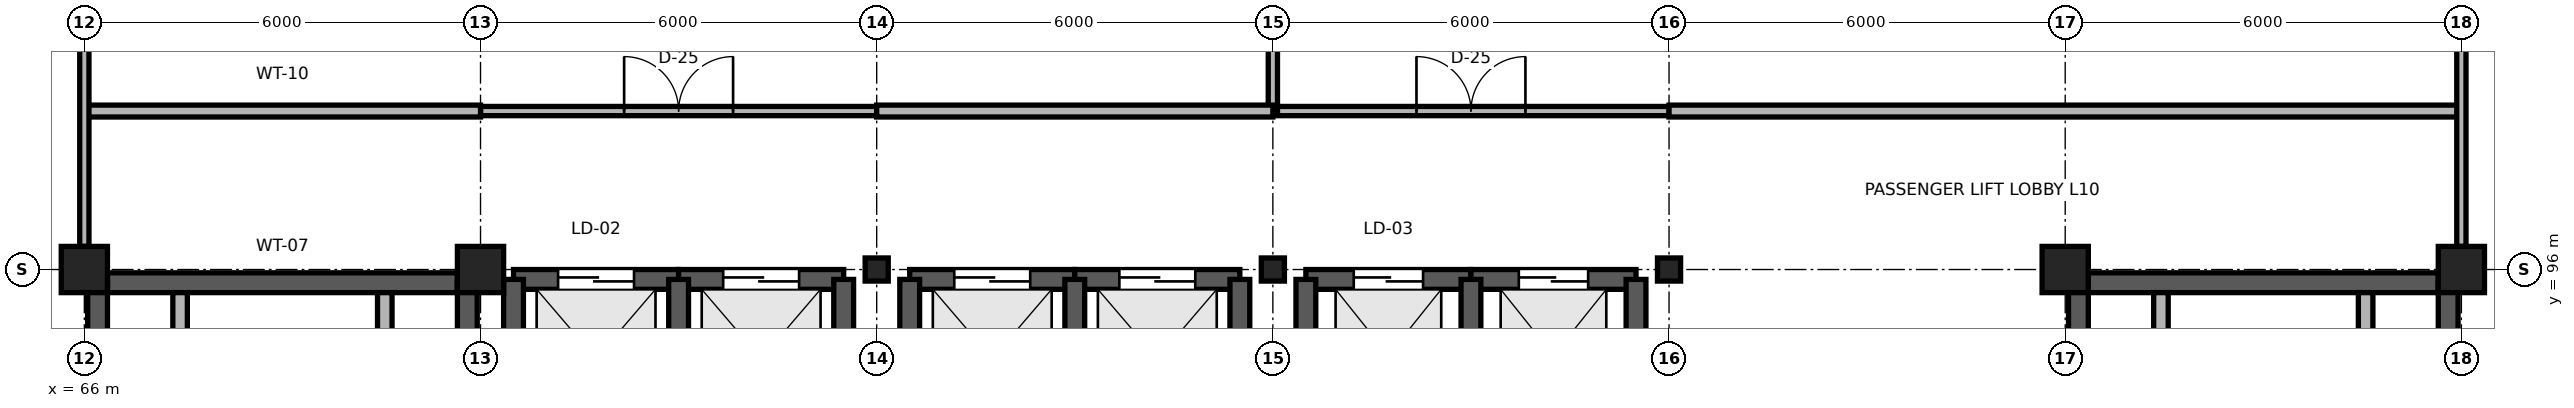
"""IFC4 building model, lengths in metres.
Left out: names, types, materials, properties, quantities, classifications, styles, units other than length and angle.
Written with IfcOpenShell. Run it as: python <this file> out.ifc"""

import sys

from ifc_helpers import new_model, si_unit, direction, frame, frame_2d, origin, origin_2d, place, context, subcontext, project, spatial, rectangle, i_section, extrude, element, fill, save


model = new_model("IFC4")
c1 = context("Model", 3, precision=1e-05, world=origin(), true_north=direction((0.0, 1.0)))
c2 = subcontext(c1, "Body", "Model", "MODEL_VIEW")
j1 = project(units=[si_unit("LENGTHUNIT", "METRE"), si_unit("PLANEANGLEUNIT", "RADIAN")], contexts=[c1])
p1 = place(None, origin())
s1 = spatial("IfcSite", under=j1, at=p1, CompositionType="ELEMENT")
p2 = place(p1, origin())
s2 = spatial("IfcBuilding", under=s1, at=p2, CompositionType="ELEMENT")
p3 = place(p2, frame((0.0, 0.0, 40.5)))
s3 = spatial("IfcBuildingStorey", under=s2, at=p3, CompositionType="ELEMENT", Elevation=40.5)
for number, where, z_axis, x_axis in (
    (1, (66.0, 96.0, 0.0), (0.0, 0.0, 1.0), (1.0, 0.0, 0.0)),
    (2, (72.0, 96.0, 0.0), (0.0, 0.0, 1.0), (1.0, 0.0, 0.0)),
):
    element("IfcColumn", number, at=place(p3, frame(where, z_axis=z_axis, x_axis=x_axis)), inside=s3, PredefinedType="COLUMN", context=c2, shape_type="SweptSolid", body=[
        extrude(rectangle(XDim=0.7, YDim=0.7, at=origin_2d()), origin(), (0.0, 0.0, 1.0), 3.9),
    ])
for number, where, z_axis, x_axis in (
    (3, (78.0, 96.0, 0.0), (0.0, 0.0, 1.0), (1.0, 0.0, 0.0)),
    (4, (84.0, 96.0, 0.0), (0.0, 0.0, 1.0), (1.0, 0.0, 0.0)),
    (5, (90.0, 96.0, 0.0), (0.0, 0.0, 1.0), (1.0, 0.0, 0.0)),
):
    element("IfcColumn", number, at=place(p3, frame(where, z_axis=z_axis, x_axis=x_axis)), inside=s3, PredefinedType="COLUMN", context=c2, shape_type="SweptSolid", body=[
        extrude(i_section(OverallWidth=0.35, OverallDepth=0.35, WebThickness=0.012, FlangeThickness=0.019, FilletRadius=0.02, at=origin_2d()), origin(), (0.0, 0.0, 1.0), 3.9),
    ])
for number, where, z_axis, x_axis in (
    (6, (96.0, 96.0, 0.0), (0.0, 0.0, 1.0), (1.0, 0.0, 0.0)),
    (7, (102.0, 96.0, 0.0), (0.0, 0.0, 1.0), (1.0, 0.0, 0.0)),
):
    element("IfcColumn", number, at=place(p3, frame(where, z_axis=z_axis, x_axis=x_axis)), inside=s3, PredefinedType="COLUMN", context=c2, shape_type="SweptSolid", body=[
        extrude(rectangle(XDim=0.7, YDim=0.7, at=origin_2d()), origin(), (0.0, 0.0, 1.0), 3.9),
    ])
p4 = place(p3, frame((66.35, 95.8, 0.0), z_axis=(0.0, 0.0, 1.0), x_axis=(1.0, 0.0, 0.0)))
e8 = element("IfcWall", 8, at=p4, inside=s3, PredefinedType="SHEAR", context=c2, shape_type="SweptSolid", body=[
    extrude(rectangle(XDim=5.3, YDim=0.3, at=frame_2d((2.65, 0.0))), origin(), (0.0, 0.0, 1.0), 3.74),
])
for number, where, z_axis, x_axis in (
    (9, (66.2, 84.0, 0.0), (0.0, 0.0, 1.0), (0.0, 1.0, 0.0)),
    (10, (71.8, 84.0, 0.0), (0.0, 0.0, 1.0), (0.0, 1.0, 0.0)),
):
    element("IfcWall", number, at=place(p3, frame(where, z_axis=z_axis, x_axis=x_axis)), inside=s3, PredefinedType="SHEAR", context=c2, shape_type="SweptSolid", body=[
        extrude(rectangle(XDim=11.8, YDim=0.3, at=frame_2d((5.9, 0.0))), origin(), (0.0, 0.0, 1.0), 3.74),
    ])
for number, where, z_axis, x_axis in (
    (11, (67.45, 94.4, 0.0), (0.0, 0.0, 1.0), (0.0, 1.0, 0.0)),
    (12, (70.55, 94.4, 0.0), (0.0, 0.0, 1.0), (0.0, 1.0, 0.0)),
):
    element("IfcWall", number, at=place(p3, frame(where, z_axis=z_axis, x_axis=x_axis)), inside=s3, PredefinedType="PARTITIONING", context=c2, shape_type="SweptSolid", body=[
        extrude(rectangle(XDim=1.25, YDim=0.22, at=frame_2d((0.625, 0.0))), origin(), (0.0, 0.0, 1.0), 3.74),
    ])
p5 = place(p3, frame((96.35, 95.8, 0.0), z_axis=(0.0, 0.0, 1.0), x_axis=(1.0, 0.0, 0.0)))
e13 = element("IfcWall", 13, at=p5, inside=s3, PredefinedType="SHEAR", context=c2, shape_type="SweptSolid", body=[
    extrude(rectangle(XDim=5.3, YDim=0.3, at=frame_2d((2.65, 0.0))), origin(), (0.0, 0.0, 1.0), 3.74),
])
for number, where, z_axis, x_axis in (
    (14, (96.2, 84.0, 0.0), (0.0, 0.0, 1.0), (0.0, 1.0, 0.0)),
    (15, (101.8, 84.0, 0.0), (0.0, 0.0, 1.0), (0.0, 1.0, 0.0)),
):
    element("IfcWall", number, at=place(p3, frame(where, z_axis=z_axis, x_axis=x_axis)), inside=s3, PredefinedType="SHEAR", context=c2, shape_type="SweptSolid", body=[
        extrude(rectangle(XDim=11.8, YDim=0.3, at=frame_2d((5.9, 0.0))), origin(), (0.0, 0.0, 1.0), 3.74),
    ])
for number, where, z_axis, x_axis in (
    (16, (97.45, 94.4, 0.0), (0.0, 0.0, 1.0), (0.0, 1.0, 0.0)),
    (17, (100.55, 94.4, 0.0), (0.0, 0.0, 1.0), (0.0, 1.0, 0.0)),
):
    element("IfcWall", number, at=place(p3, frame(where, z_axis=z_axis, x_axis=x_axis)), inside=s3, PredefinedType="PARTITIONING", context=c2, shape_type="SweptSolid", body=[
        extrude(rectangle(XDim=1.25, YDim=0.22, at=frame_2d((0.625, 0.0))), origin(), (0.0, 0.0, 1.0), 3.74),
    ])
p6 = place(p3, frame((72.5, 95.85, 0.0), z_axis=(0.0, 0.0, 1.0), x_axis=(1.0, 0.0, 0.0)))
e18 = element("IfcWall", 18, at=p6, inside=s3, PredefinedType="SHEAR", context=c2, shape_type="SweptSolid", body=[
    extrude(rectangle(XDim=2.5, YDim=0.3, at=frame_2d((1.25, 0.0))), origin(), (0.0, 0.0, 1.0), 3.74),
])
p7 = place(p6, frame((0.675, 0.0, 0.0)))
e19 = element("IfcOpeningElement", 19, at=p7, cuts=e18, PredefinedType="OPENING", context=c2, shape_type="SweptSolid", body=[
    extrude(rectangle(XDim=1.15, YDim=2.15, at=frame_2d((0.575, 1.075))), frame((0.0, 0.165, 0.0), z_axis=(0.0, -1.0, 0.0), x_axis=(1.0, 0.0, 0.0)), (0.0, 0.0, 1.0), 0.33),
])
p8 = place(p3, frame((72.5, 92.45, 0.0), z_axis=(0.0, 0.0, 1.0), x_axis=(0.0, 1.0, 0.0)))
e20 = element("IfcWall", 20, at=p8, inside=s3, PredefinedType="SHEAR", context=c2, shape_type="SweptSolid", body=[
    extrude(rectangle(XDim=3.4, YDim=0.3, at=frame_2d((1.7, 0.0))), origin(), (0.0, 0.0, 1.0), 3.74),
])
p9 = place(p3, frame((75.0, 95.85, 0.0), z_axis=(0.0, 0.0, 1.0), x_axis=(1.0, 0.0, 0.0)))
e21 = element("IfcWall", 21, at=p9, inside=s3, PredefinedType="SHEAR", context=c2, shape_type="SweptSolid", body=[
    extrude(rectangle(XDim=2.5, YDim=0.3, at=frame_2d((1.25, 0.0))), origin(), (0.0, 0.0, 1.0), 3.74),
])
p10 = place(p9, frame((0.675, 0.0, 0.0)))
e22 = element("IfcOpeningElement", 22, at=p10, cuts=e21, PredefinedType="OPENING", context=c2, shape_type="SweptSolid", body=[
    extrude(rectangle(XDim=1.15, YDim=2.15, at=frame_2d((0.575, 1.075))), frame((0.0, 0.165, 0.0), z_axis=(0.0, -1.0, 0.0), x_axis=(1.0, 0.0, 0.0)), (0.0, 0.0, 1.0), 0.33),
])
for number, where, z_axis, x_axis in (
    (23, (75.0, 92.45, 0.0), (0.0, 0.0, 1.0), (0.0, 1.0, 0.0)),
    (24, (77.5, 92.45, 0.0), (0.0, 0.0, 1.0), (0.0, 1.0, 0.0)),
):
    element("IfcWall", number, at=place(p3, frame(where, z_axis=z_axis, x_axis=x_axis)), inside=s3, PredefinedType="SHEAR", context=c2, shape_type="SweptSolid", body=[
        extrude(rectangle(XDim=3.4, YDim=0.3, at=frame_2d((1.7, 0.0))), origin(), (0.0, 0.0, 1.0), 3.74),
    ])
p11 = place(p3, frame((78.5, 95.85, 0.0), z_axis=(0.0, 0.0, 1.0), x_axis=(1.0, 0.0, 0.0)))
e25 = element("IfcWall", 25, at=p11, inside=s3, PredefinedType="SHEAR", context=c2, shape_type="SweptSolid", body=[
    extrude(rectangle(XDim=2.5, YDim=0.3, at=frame_2d((1.25, 0.0))), origin(), (0.0, 0.0, 1.0), 3.74),
])
p12 = place(p11, frame((0.675, 0.0, 0.0)))
e26 = element("IfcOpeningElement", 26, at=p12, cuts=e25, PredefinedType="OPENING", context=c2, shape_type="SweptSolid", body=[
    extrude(rectangle(XDim=1.15, YDim=2.15, at=frame_2d((0.575, 1.075))), frame((0.0, 0.165, 0.0), z_axis=(0.0, -1.0, 0.0), x_axis=(1.0, 0.0, 0.0)), (0.0, 0.0, 1.0), 0.33),
])
p13 = place(p3, frame((78.5, 92.45, 0.0), z_axis=(0.0, 0.0, 1.0), x_axis=(0.0, 1.0, 0.0)))
e27 = element("IfcWall", 27, at=p13, inside=s3, PredefinedType="SHEAR", context=c2, shape_type="SweptSolid", body=[
    extrude(rectangle(XDim=3.4, YDim=0.3, at=frame_2d((1.7, 0.0))), origin(), (0.0, 0.0, 1.0), 3.74),
])
p14 = place(p3, frame((81.0, 95.85, 0.0), z_axis=(0.0, 0.0, 1.0), x_axis=(1.0, 0.0, 0.0)))
e28 = element("IfcWall", 28, at=p14, inside=s3, PredefinedType="SHEAR", context=c2, shape_type="SweptSolid", body=[
    extrude(rectangle(XDim=2.5, YDim=0.3, at=frame_2d((1.25, 0.0))), origin(), (0.0, 0.0, 1.0), 3.74),
])
p15 = place(p14, frame((0.675, 0.0, 0.0)))
e29 = element("IfcOpeningElement", 29, at=p15, cuts=e28, PredefinedType="OPENING", context=c2, shape_type="SweptSolid", body=[
    extrude(rectangle(XDim=1.15, YDim=2.15, at=frame_2d((0.575, 1.075))), frame((0.0, 0.165, 0.0), z_axis=(0.0, -1.0, 0.0), x_axis=(1.0, 0.0, 0.0)), (0.0, 0.0, 1.0), 0.33),
])
for number, where, z_axis, x_axis in (
    (30, (81.0, 92.45, 0.0), (0.0, 0.0, 1.0), (0.0, 1.0, 0.0)),
    (31, (83.5, 92.45, 0.0), (0.0, 0.0, 1.0), (0.0, 1.0, 0.0)),
):
    element("IfcWall", number, at=place(p3, frame(where, z_axis=z_axis, x_axis=x_axis)), inside=s3, PredefinedType="SHEAR", context=c2, shape_type="SweptSolid", body=[
        extrude(rectangle(XDim=3.4, YDim=0.3, at=frame_2d((1.7, 0.0))), origin(), (0.0, 0.0, 1.0), 3.74),
    ])
p16 = place(p3, frame((84.5, 95.85, 0.0), z_axis=(0.0, 0.0, 1.0), x_axis=(1.0, 0.0, 0.0)))
e32 = element("IfcWall", 32, at=p16, inside=s3, PredefinedType="SHEAR", context=c2, shape_type="SweptSolid", body=[
    extrude(rectangle(XDim=2.5, YDim=0.3, at=frame_2d((1.25, 0.0))), origin(), (0.0, 0.0, 1.0), 3.74),
])
p17 = place(p16, frame((0.725, 0.0, 0.0)))
e33 = element("IfcOpeningElement", 33, at=p17, cuts=e32, PredefinedType="OPENING", context=c2, shape_type="SweptSolid", body=[
    extrude(rectangle(XDim=1.05, YDim=2.1, at=frame_2d((0.525, 1.05))), frame((0.0, 0.165, 0.0), z_axis=(0.0, -1.0, 0.0), x_axis=(1.0, 0.0, 0.0)), (0.0, 0.0, 1.0), 0.33),
])
p18 = place(p3, frame((84.5, 92.45, 0.0), z_axis=(0.0, 0.0, 1.0), x_axis=(0.0, 1.0, 0.0)))
e34 = element("IfcWall", 34, at=p18, inside=s3, PredefinedType="SHEAR", context=c2, shape_type="SweptSolid", body=[
    extrude(rectangle(XDim=3.4, YDim=0.3, at=frame_2d((1.7, 0.0))), origin(), (0.0, 0.0, 1.0), 3.74),
])
p19 = place(p3, frame((87.0, 95.85, 0.0), z_axis=(0.0, 0.0, 1.0), x_axis=(1.0, 0.0, 0.0)))
e35 = element("IfcWall", 35, at=p19, inside=s3, PredefinedType="SHEAR", context=c2, shape_type="SweptSolid", body=[
    extrude(rectangle(XDim=2.5, YDim=0.3, at=frame_2d((1.25, 0.0))), origin(), (0.0, 0.0, 1.0), 3.74),
])
p20 = place(p19, frame((0.725, 0.0, 0.0)))
e36 = element("IfcOpeningElement", 36, at=p20, cuts=e35, PredefinedType="OPENING", context=c2, shape_type="SweptSolid", body=[
    extrude(rectangle(XDim=1.05, YDim=2.1, at=frame_2d((0.525, 1.05))), frame((0.0, 0.165, 0.0), z_axis=(0.0, -1.0, 0.0), x_axis=(1.0, 0.0, 0.0)), (0.0, 0.0, 1.0), 0.33),
])
for number, where, z_axis, x_axis in (
    (37, (87.0, 92.45, 0.0), (0.0, 0.0, 1.0), (0.0, 1.0, 0.0)),
    (38, (89.5, 92.45, 0.0), (0.0, 0.0, 1.0), (0.0, 1.0, 0.0)),
):
    element("IfcWall", number, at=place(p3, frame(where, z_axis=z_axis, x_axis=x_axis)), inside=s3, PredefinedType="SHEAR", context=c2, shape_type="SweptSolid", body=[
        extrude(rectangle(XDim=3.4, YDim=0.3, at=frame_2d((1.7, 0.0))), origin(), (0.0, 0.0, 1.0), 3.74),
    ])
p21 = place(p3, frame((72.0, 98.4, 0.0), z_axis=(0.0, 0.0, 1.0), x_axis=(1.0, 0.0, 0.0)))
e39 = element("IfcWall", 39, at=p21, inside=s3, PredefinedType="PARTITIONING", context=c2, shape_type="SweptSolid", body=[
    extrude(rectangle(XDim=6.0, YDim=0.14, at=frame_2d((3.0, 0.0))), origin(), (0.0, 0.0, 1.0), 3.74),
])
p22 = place(p21, frame((2.175, 0.0, 0.0)))
e40 = element("IfcOpeningElement", 40, at=p22, cuts=e39, PredefinedType="OPENING", context=c2, shape_type="SweptSolid", body=[
    extrude(rectangle(XDim=1.65, YDim=2.35, at=frame_2d((0.825, 1.175))), frame((0.0, 0.085, 0.0), z_axis=(0.0, -1.0, 0.0), x_axis=(1.0, 0.0, 0.0)), (0.0, 0.0, 1.0), 0.17),
])
p23 = place(p3, frame((84.0, 98.4, 0.0), z_axis=(0.0, 0.0, 1.0), x_axis=(1.0, 0.0, 0.0)))
e41 = element("IfcWall", 41, at=p23, inside=s3, PredefinedType="PARTITIONING", context=c2, shape_type="SweptSolid", body=[
    extrude(rectangle(XDim=6.0, YDim=0.14, at=frame_2d((3.0, 0.0))), origin(), (0.0, 0.0, 1.0), 3.74),
])
p24 = place(p23, frame((2.175, 0.0, 0.0)))
e42 = element("IfcOpeningElement", 42, at=p24, cuts=e41, PredefinedType="OPENING", context=c2, shape_type="SweptSolid", body=[
    extrude(rectangle(XDim=1.65, YDim=2.35, at=frame_2d((0.825, 1.175))), frame((0.0, 0.085, 0.0), z_axis=(0.0, -1.0, 0.0), x_axis=(1.0, 0.0, 0.0)), (0.0, 0.0, 1.0), 0.17),
])
p25 = place(p3, frame((84.0, 98.4, 0.0), z_axis=(0.0, 0.0, 1.0), x_axis=(0.0, 1.0, 0.0)))
e43 = element("IfcWall", 43, at=p25, inside=s3, PredefinedType="PARTITIONING", context=c2, shape_type="SweptSolid", body=[
    extrude(rectangle(XDim=2.95, YDim=0.14, at=frame_2d((1.475, 0.0))), origin(), (0.0, 0.0, 1.0), 3.348),
])
for number, where, z_axis, x_axis in (
    (44, (66.0, 98.4, 0.0), (0.0, 0.0, 1.0), (1.0, 0.0, 0.0)),
    (45, (78.0, 98.4, 0.0), (0.0, 0.0, 1.0), (1.0, 0.0, 0.0)),
):
    element("IfcWall", number, at=place(p3, frame(where, z_axis=z_axis, x_axis=x_axis)), inside=s3, PredefinedType="PARTITIONING", context=c2, shape_type="SweptSolid", body=[
        extrude(rectangle(XDim=6.0, YDim=0.18, at=frame_2d((3.0, 0.0))), origin(), (0.0, 0.0, 1.0), 3.74),
    ])
p26 = place(p3, frame((90.0, 98.4, 0.0), z_axis=(0.0, 0.0, 1.0), x_axis=(1.0, 0.0, 0.0)))
e46 = element("IfcWall", 46, at=p26, inside=s3, PredefinedType="PARTITIONING", context=c2, shape_type="SweptSolid", body=[
    extrude(rectangle(XDim=12.0, YDim=0.18, at=frame_2d((6.0, 0.0))), origin(), (0.0, 0.0, 1.0), 3.74),
])
for number, where, z_axis, x_axis in (
    (47, (66.0, 96.35, 0.0), (0.0, 0.0, 1.0), (0.0, 1.0, 0.0)),
    (48, (102.0, 96.35, 0.0), (0.0, 0.0, 1.0), (0.0, 1.0, 0.0)),
):
    element("IfcWall", number, at=place(p3, frame(where, z_axis=z_axis, x_axis=x_axis)), inside=s3, PredefinedType="PARTITIONING", context=c2, shape_type="SweptSolid", body=[
        extrude(rectangle(XDim=5.3, YDim=0.14, at=frame_2d((2.65, 0.0))), origin(), (0.0, 0.0, 1.0), 3.348),
    ])
p27 = place(p7, origin())
e49 = element("IfcDoor", 49, at=p27, inside=s3, OperationType="DOUBLE_DOOR_SLIDING", PredefinedType="DOOR", context=c2, shape_type="SweptSolid", body=[
    extrude(rectangle(XDim=1.15, YDim=2.15, at=frame_2d((0.575, 1.075))), frame((0.0, 0.025, 0.0), z_axis=(0.0, -1.0, 0.0), x_axis=(1.0, 0.0, 0.0)), (0.0, 0.0, 1.0), 0.05),
])
fill(e19, e49)
p28 = place(p10, origin())
e50 = element("IfcDoor", 50, at=p28, inside=s3, OperationType="DOUBLE_DOOR_SLIDING", PredefinedType="DOOR", context=c2, shape_type="SweptSolid", body=[
    extrude(rectangle(XDim=1.15, YDim=2.15, at=frame_2d((0.575, 1.075))), frame((0.0, 0.025, 0.0), z_axis=(0.0, -1.0, 0.0), x_axis=(1.0, 0.0, 0.0)), (0.0, 0.0, 1.0), 0.05),
])
fill(e22, e50)
p29 = place(p12, origin())
e51 = element("IfcDoor", 51, at=p29, inside=s3, OperationType="DOUBLE_DOOR_SLIDING", PredefinedType="DOOR", context=c2, shape_type="SweptSolid", body=[
    extrude(rectangle(XDim=1.15, YDim=2.15, at=frame_2d((0.575, 1.075))), frame((0.0, 0.025, 0.0), z_axis=(0.0, -1.0, 0.0), x_axis=(1.0, 0.0, 0.0)), (0.0, 0.0, 1.0), 0.05),
])
fill(e26, e51)
p30 = place(p15, origin())
e52 = element("IfcDoor", 52, at=p30, inside=s3, OperationType="DOUBLE_DOOR_SLIDING", PredefinedType="DOOR", context=c2, shape_type="SweptSolid", body=[
    extrude(rectangle(XDim=1.15, YDim=2.15, at=frame_2d((0.575, 1.075))), frame((0.0, 0.025, 0.0), z_axis=(0.0, -1.0, 0.0), x_axis=(1.0, 0.0, 0.0)), (0.0, 0.0, 1.0), 0.05),
])
fill(e29, e52)
p31 = place(p17, origin())
e53 = element("IfcDoor", 53, at=p31, inside=s3, OperationType="DOUBLE_DOOR_SLIDING", PredefinedType="DOOR", context=c2, shape_type="SweptSolid", body=[
    extrude(rectangle(XDim=1.05, YDim=2.1, at=frame_2d((0.525, 1.05))), frame((0.0, 0.025, 0.0), z_axis=(0.0, -1.0, 0.0), x_axis=(1.0, 0.0, 0.0)), (0.0, 0.0, 1.0), 0.05),
])
fill(e33, e53)
p32 = place(p20, origin())
e54 = element("IfcDoor", 54, at=p32, inside=s3, OperationType="DOUBLE_DOOR_SLIDING", PredefinedType="DOOR", context=c2, shape_type="SweptSolid", body=[
    extrude(rectangle(XDim=1.05, YDim=2.1, at=frame_2d((0.525, 1.05))), frame((0.0, 0.025, 0.0), z_axis=(0.0, -1.0, 0.0), x_axis=(1.0, 0.0, 0.0)), (0.0, 0.0, 1.0), 0.05),
])
fill(e36, e54)
p33 = place(p22, origin())
e55 = element("IfcDoor", 55, at=p33, inside=s3, OperationType="DOUBLE_DOOR_SINGLE_SWING", PredefinedType="DOOR", context=c2, shape_type="SweptSolid", body=[
    extrude(rectangle(XDim=1.65, YDim=2.35, at=frame_2d((0.825, 1.175))), frame((0.0, 0.025, 0.0), z_axis=(0.0, -1.0, 0.0), x_axis=(1.0, 0.0, 0.0)), (0.0, 0.0, 1.0), 0.05),
])
fill(e40, e55)
p34 = place(p24, origin())
e56 = element("IfcDoor", 56, at=p34, inside=s3, OperationType="DOUBLE_DOOR_SINGLE_SWING", PredefinedType="DOOR", context=c2, shape_type="SweptSolid", body=[
    extrude(rectangle(XDim=1.65, YDim=2.35, at=frame_2d((0.825, 1.175))), frame((0.0, 0.025, 0.0), z_axis=(0.0, -1.0, 0.0), x_axis=(1.0, 0.0, 0.0)), (0.0, 0.0, 1.0), 0.05),
])
fill(e42, e56)
save(model, sys.argv[1])
